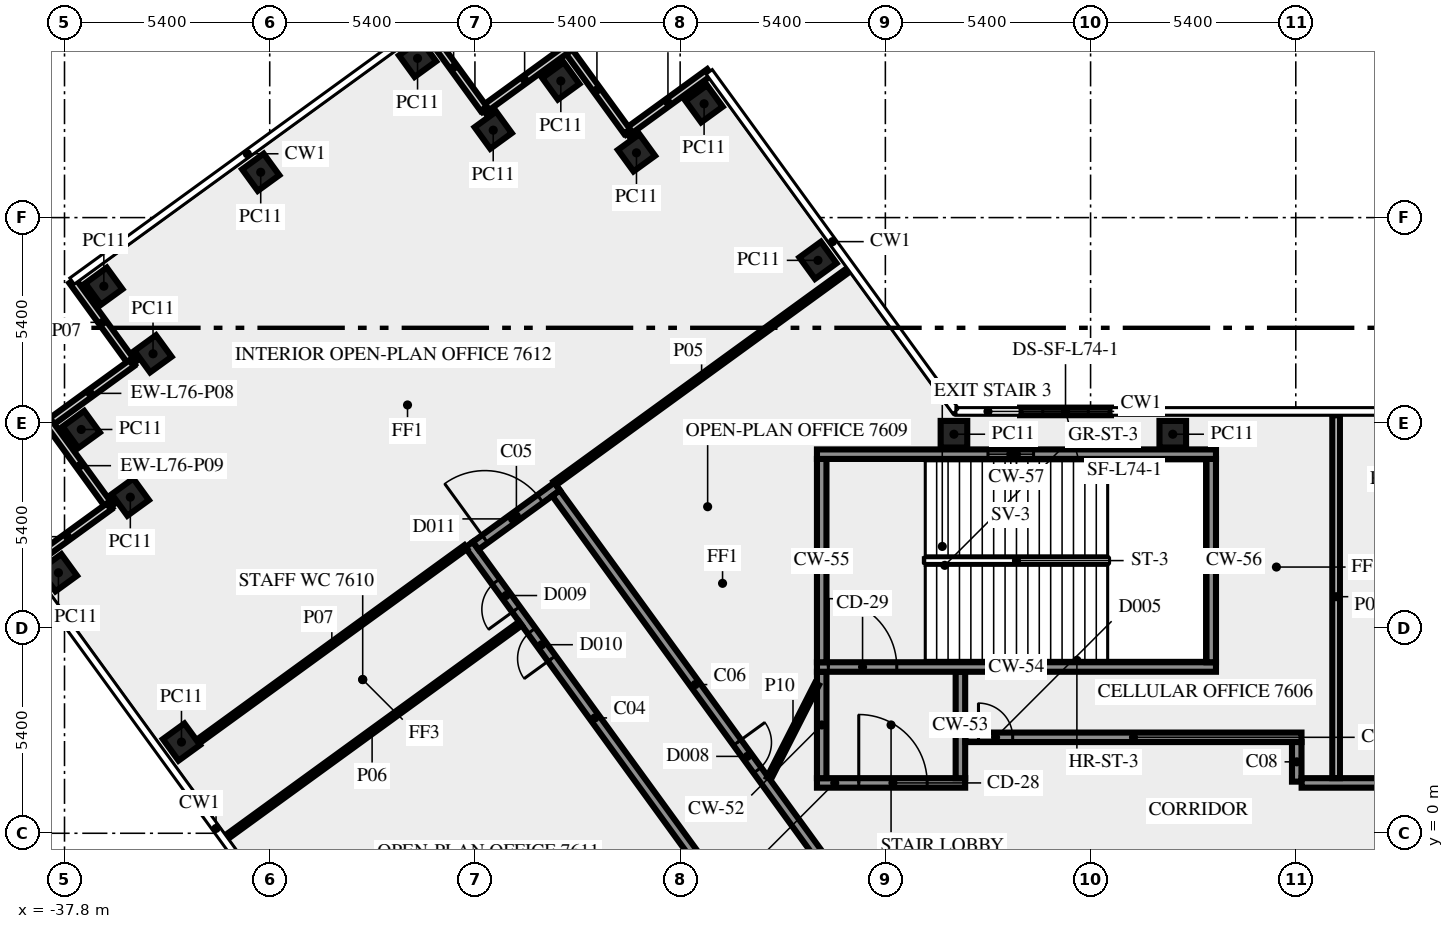
"""IFC4 building model, lengths in metres.
Left out: names, types, materials, properties, quantities, classifications, styles, units other than length and angle.
Written with IfcOpenShell. Run it as: python <this file> out.ifc"""

import sys

from ifc_helpers import new_model, si_unit, direction, frame, frame_2d, origin, origin_2d, place, context, subcontext, project, spatial, rectangle, extrude, element, fill, save


model = new_model("IFC4")
c1 = context("Model", 3, precision=1e-05, world=origin(), true_north=direction((0.0, 1.0)))
c2 = subcontext(c1, "Body", "Model", "MODEL_VIEW")
j1 = project(units=[si_unit("LENGTHUNIT", "METRE"), si_unit("PLANEANGLEUNIT", "RADIAN")], contexts=[c1])
p1 = place(None, origin())
s1 = spatial("IfcSite", under=j1, at=p1, CompositionType="ELEMENT")
p2 = place(p1, origin())
s2 = spatial("IfcBuilding", under=s1, at=p2, CompositionType="ELEMENT")
p3 = place(p2, frame((0.0, 0.0, 327.0)))
s3 = spatial("IfcBuildingStorey", under=s2, at=p3, CompositionType="ELEMENT", Elevation=327.0)
for number, where, z_axis, x_axis in (
    (1, (-17.974, 15.075, 0.0), (0.0, 0.0, 1.0), (-0.588, 0.809, 0.0)),
    (2, (-20.97, 19.195, 0.0), (0.0, 0.0, 1.0), (-0.588, 0.809, 0.0)),
    (3, (-22.749, 17.904, 0.0), (0.0, 0.0, 1.0), (-0.588, 0.809, 0.0)),
    (4, (-24.74, 19.795, 0.0), (0.0, 0.0, 1.0), (-0.588, 0.809, 0.0)),
    (5, (-26.519, 18.5, 0.0), (0.0, 0.0, 1.0), (-0.588, 0.809, 0.0)),
    (6, (-28.51, 20.39, 0.0), (0.0, 0.0, 1.0), (-0.809, -0.588, 0.0)),
    (7, (-32.637, 17.393, 0.0), (0.0, 0.0, 1.0), (-0.809, -0.588, 0.0)),
    (8, (-36.765, 14.395, 0.0), (0.0, 0.0, 1.0), (0.588, -0.809, 0.0)),
    (9, (-35.471, 12.616, 0.0), (0.0, 0.0, 1.0), (-0.809, -0.588, 0.0)),
    (10, (-37.36, 10.625, 0.0), (0.0, 0.0, 1.0), (0.588, -0.809, 0.0)),
    (11, (-36.068, 8.844, 0.0), (0.0, 0.0, 1.0), (0.588, -0.809, 0.0)),
    (12, (-37.96, 6.855, 0.0), (0.0, 0.0, 1.0), (0.588, -0.809, 0.0)),
    (13, (-34.722, 2.4, 0.0), (0.0, 0.0, 1.0), (0.588, -0.809, 0.0)),
    (14, (-8.637, 10.5, 0.0), (0.0, 0.0, 1.0), (-1.0, 0.0, 0.0)),
    (15, (-14.395, 10.5, 0.0), (0.0, 0.0, 1.0), (-1.0, 0.0, 0.0)),
):
    element("IfcColumn", number, at=place(p3, frame(where, z_axis=z_axis, x_axis=x_axis)), inside=s3, PredefinedType="COLUMN", context=c2, shape_type="SweptSolid", body=[
        extrude(rectangle(XDim=0.7, YDim=0.7, at=origin_2d()), origin(), (0.0, 0.0, 1.0), 3.65),
    ])
for number, where, z_axis, x_axis in (
    (16, (-20.829, 20.025, 0.0), (0.0, 0.0, 1.0), (-0.809, -0.588, 0.0)),
    (17, (-22.996, 18.466, 0.0), (0.0, 0.0, 1.0), (-0.588, 0.809, 0.0)),
):
    element("IfcWall", number, at=place(p3, frame(where, z_axis=z_axis, x_axis=x_axis)), inside=s3, PredefinedType="SOLIDWALL", context=c2, shape_type="SweptSolid", body=[
        extrude(rectangle(XDim=2.7, YDim=0.2, at=frame_2d((1.35, 0.0))), origin(), (0.0, 0.0, 1.0), 3.65),
    ])
for number, where, z_axis, x_axis in (
    (18, (-24.6, 20.623, 0.0), (0.0, 0.0, 1.0), (-0.809, -0.588, 0.0)),
    (19, (-26.768, 19.063, 0.0), (0.0, 0.0, 1.0), (-0.588, 0.809, 0.0)),
):
    element("IfcWall", number, at=place(p3, frame(where, z_axis=z_axis, x_axis=x_axis)), inside=s3, PredefinedType="SOLIDWALL", context=c2, shape_type="SweptSolid", body=[
        extrude(rectangle(XDim=2.7, YDim=0.2, at=frame_2d((1.35, 0.0))), origin(), (0.0, 0.0, 1.0), 3.65),
    ])
for number, where, z_axis, x_axis in (
    (20, (-37.592, 14.536, 0.0), (0.0, 0.0, 1.0), (0.588, -0.809, 0.0)),
    (21, (-36.032, 12.369, 0.0), (0.0, 0.0, 1.0), (-0.809, -0.588, 0.0)),
    (22, (-38.189, 10.765, 0.0), (0.0, 0.0, 1.0), (0.588, -0.809, 0.0)),
    (23, (-36.629, 8.597, 0.0), (0.0, 0.0, 1.0), (-0.809, -0.588, 0.0)),
):
    element("IfcWall", number, at=place(p3, frame(where, z_axis=z_axis, x_axis=x_axis)), inside=s3, PredefinedType="SOLIDWALL", context=c2, shape_type="SweptSolid", body=[
        extrude(rectangle(XDim=2.7, YDim=0.2, at=frame_2d((1.35, 0.0))), origin(), (0.0, 0.0, 1.0), 3.65),
    ])
p4 = place(p3, frame((-10.263, 11.1, 0.0), z_axis=(0.0, 0.0, 1.0), x_axis=(-1.0, 0.0, 0.0)))
e24 = element("IfcWall", 24, at=p4, inside=s3, PredefinedType="SOLIDWALL", context=c2, shape_type="SweptSolid", body=[
    extrude(rectangle(XDim=2.392, YDim=0.2, at=frame_2d((1.196, 0.0))), origin(), (0.0, 0.0, 1.0), 3.65),
])
p5 = place(p4, frame((0.596, 0.0, 1.0)))
e25 = element("IfcOpeningElement", 25, at=p5, cuts=e24, PredefinedType="OPENING", context=c2, shape_type="SweptSolid", body=[
    extrude(rectangle(XDim=1.2, YDim=1.2, at=frame_2d((0.6, 0.6))), frame((0.0, 0.11, 0.0), z_axis=(0.0, -1.0, 0.0), x_axis=(1.0, 0.0, 0.0)), (0.0, 0.0, 1.0), 0.22),
])
p6 = place(p3, frame((-18.0, 1.325, 0.0), z_axis=(0.0, 0.0, 1.0), x_axis=(1.0, 0.0, 0.0)))
e26 = element("IfcWall", 26, at=p6, inside=s3, PredefinedType="SHEAR", context=c2, shape_type="SweptSolid", body=[
    extrude(rectangle(XDim=3.9, YDim=0.25, at=frame_2d((1.95, 0.0))), origin(), (0.0, 0.0, 1.0), 3.65),
])
p7 = place(p6, frame((1.1, 0.0, 0.0)))
e27 = element("IfcOpeningElement", 27, at=p7, cuts=e26, PredefinedType="OPENING", context=c2, shape_type="SweptSolid", body=[
    extrude(rectangle(XDim=1.8, YDim=2.1, at=frame_2d((0.9, 1.05))), frame((0.0, 0.135, 0.0), z_axis=(0.0, -1.0, 0.0), x_axis=(1.0, 0.0, 0.0)), (0.0, 0.0, 1.0), 0.27),
])
for number, where, z_axis, x_axis in (
    (28, (-17.875, 1.45, 0.0), (0.0, 0.0, 1.0), (0.0, 1.0, 0.0)),
    (29, (-14.225, 1.45, 0.0), (0.0, 0.0, 1.0), (0.0, 1.0, 0.0)),
):
    element("IfcWall", number, at=place(p3, frame(where, z_axis=z_axis, x_axis=x_axis)), inside=s3, PredefinedType="SHEAR", context=c2, shape_type="SweptSolid", body=[
        extrude(rectangle(XDim=2.8, YDim=0.25, at=frame_2d((1.4, 0.0))), origin(), (0.0, 0.0, 1.0), 3.65),
    ])
p8 = place(p3, frame((-18.0, 4.375, 0.0), z_axis=(0.0, 0.0, 1.0), x_axis=(1.0, 0.0, 0.0)))
e30 = element("IfcWall", 30, at=p8, inside=s3, PredefinedType="SHEAR", context=c2, shape_type="SweptSolid", body=[
    extrude(rectangle(XDim=10.5, YDim=0.25, at=frame_2d((5.25, 0.0))), origin(), (0.0, 0.0, 1.0), 3.65),
])
p9 = place(p8, frame((0.3, 0.0, 0.0)))
e31 = element("IfcOpeningElement", 31, at=p9, cuts=e30, PredefinedType="OPENING", context=c2, shape_type="SweptSolid", body=[
    extrude(rectangle(XDim=1.8, YDim=2.1, at=frame_2d((0.9, 1.05))), frame((0.0, 0.135, 0.0), z_axis=(0.0, -1.0, 0.0), x_axis=(1.0, 0.0, 0.0)), (0.0, 0.0, 1.0), 0.27),
])
for number, where, z_axis, x_axis in (
    (32, (-17.875, 4.5, 0.0), (0.0, 0.0, 1.0), (0.0, 1.0, 0.0)),
    (33, (-7.625, 4.5, 0.0), (0.0, 0.0, 1.0), (0.0, 1.0, 0.0)),
):
    element("IfcWall", number, at=place(p3, frame(where, z_axis=z_axis, x_axis=x_axis)), inside=s3, PredefinedType="SHEAR", context=c2, shape_type="SweptSolid", body=[
        extrude(rectangle(XDim=5.35, YDim=0.25, at=frame_2d((2.675, 0.0))), origin(), (0.0, 0.0, 1.0), 3.65),
    ])
p10 = place(p3, frame((-18.0, 9.975, 0.0), z_axis=(0.0, 0.0, 1.0), x_axis=(1.0, 0.0, 0.0)))
e34 = element("IfcWall", 34, at=p10, inside=s3, PredefinedType="SHEAR", context=c2, shape_type="SweptSolid", body=[
    extrude(rectangle(XDim=10.5, YDim=0.25, at=frame_2d((5.25, 0.0))), origin(), (0.0, 0.0, 1.0), 3.65),
])
p11 = place(p10, frame((4.5, 0.0, 1.0)))
e35 = element("IfcOpeningElement", 35, at=p11, cuts=e34, PredefinedType="OPENING", context=c2, shape_type="SweptSolid", body=[
    extrude(rectangle(XDim=1.2, YDim=1.2, at=frame_2d((0.6, 0.6))), frame((0.0, 0.135, 0.0), z_axis=(0.0, -1.0, 0.0), x_axis=(1.0, 0.0, 0.0)), (0.0, 0.0, 1.0), 0.27),
])
p12 = place(p3, frame((-20.531, -1.523, 0.0), z_axis=(0.0, 0.0, 1.0), x_axis=(-0.587782646447, 0.809018887626, 0.0)))
e36 = element("IfcWall", 36, at=p12, inside=s3, PredefinedType="SOLIDWALL", context=c2, shape_type="SweptSolid", body=[
    extrude(rectangle(XDim=11.27, YDim=0.25, at=frame_2d((5.635, 0.0))), origin(), (0.0, 0.0, 1.0), 3.65),
])
p13 = place(p12, frame((7.566, 0.0, 0.0)))
e37 = element("IfcOpeningElement", 37, at=p13, cuts=e36, PredefinedType="OPENING", context=c2, shape_type="SweptSolid", body=[
    extrude(rectangle(XDim=0.9, YDim=2.1, at=frame_2d((0.45, 1.05))), frame((0.0, 0.135, 0.0), z_axis=(0.0, -1.0, 0.0), x_axis=(1.0, 0.0, 0.0)), (0.0, 0.0, 1.0), 0.27),
])
p14 = place(p12, frame((9.165, 0.0, 0.0)))
e38 = element("IfcOpeningElement", 38, at=p14, cuts=e36, PredefinedType="OPENING", context=c2, shape_type="SweptSolid", body=[
    extrude(rectangle(XDim=0.9, YDim=2.1, at=frame_2d((0.45, 1.05))), frame((0.0, 0.135, 0.0), z_axis=(0.0, -1.0, 0.0), x_axis=(1.0, 0.0, 0.0)), (0.0, 0.0, 1.0), 0.27),
])
p15 = place(p3, frame((-26.981, 7.567, 0.0), z_axis=(0.0, 0.0, 1.0), x_axis=(0.809038743598, 0.587755315891, 0.0)))
e39 = element("IfcWall", 39, at=p15, inside=s3, PredefinedType="SOLIDWALL", context=c2, shape_type="SweptSolid", body=[
    extrude(rectangle(XDim=2.65, YDim=0.25, at=frame_2d((1.325, 0.0))), origin(), (0.0, 0.0, 1.0), 3.65),
])
p16 = place(p15, frame((0.3, 0.0, 0.0)))
e40 = element("IfcOpeningElement", 40, at=p16, cuts=e39, PredefinedType="OPENING", context=c2, shape_type="SweptSolid", body=[
    extrude(rectangle(XDim=1.8, YDim=2.1, at=frame_2d((0.9, 1.05))), frame((0.0, 0.135, 0.0), z_axis=(0.0, -1.0, 0.0), x_axis=(1.0, 0.0, 0.0)), (0.0, 0.0, 1.0), 0.27),
])
p17 = place(p3, frame((-24.865, 8.95, 0.0), z_axis=(0.0, 0.0, 1.0), x_axis=(0.587791617212, -0.809012369952, 0.0)))
e41 = element("IfcWall", 41, at=p17, inside=s3, PredefinedType="SOLIDWALL", context=c2, shape_type="SweptSolid", body=[
    extrude(rectangle(XDim=12.453, YDim=0.25, at=frame_2d((6.227, 0.0))), origin(), (0.0, 0.0, 1.0), 3.65),
])
p18 = place(p17, frame((8.112, 0.0, 0.0)))
e42 = element("IfcOpeningElement", 42, at=p18, cuts=e41, PredefinedType="OPENING", context=c2, shape_type="SweptSolid", body=[
    extrude(rectangle(XDim=0.9, YDim=2.1, at=frame_2d((0.45, 1.05))), frame((0.0, 0.135, 0.0), z_axis=(0.0, -1.0, 0.0), x_axis=(1.0, 0.0, 0.0)), (0.0, 0.0, 1.0), 0.27),
])
p19 = place(p3, frame((-14.09, 2.525, 0.0), z_axis=(0.0, 0.0, 1.0), x_axis=(1.0, 0.0, 0.0)))
e43 = element("IfcWall", 43, at=p19, inside=s3, PredefinedType="SOLIDWALL", context=c2, shape_type="SweptSolid", body=[
    extrude(rectangle(XDim=8.84, YDim=0.25, at=frame_2d((4.42, 0.0))), origin(), (0.0, 0.0, 1.0), 3.65),
])
p20 = place(p19, frame((0.34, 0.0, 0.0)))
e44 = element("IfcOpeningElement", 44, at=p20, cuts=e43, PredefinedType="OPENING", context=c2, shape_type="SweptSolid", body=[
    extrude(rectangle(XDim=0.9, YDim=2.1, at=frame_2d((0.45, 1.05))), frame((0.0, 0.135, 0.0), z_axis=(0.0, -1.0, 0.0), x_axis=(1.0, 0.0, 0.0)), (0.0, 0.0, 1.0), 0.27),
])
p21 = place(p3, frame((-5.375, 2.4, 0.0), z_axis=(0.0, 0.0, 1.0), x_axis=(0.0, -1.0, 0.0)))
e45 = element("IfcWall", 45, at=p21, inside=s3, PredefinedType="SOLIDWALL", context=c2, shape_type="SweptSolid", body=[
    extrude(rectangle(XDim=1.041, YDim=0.25, at=frame_2d((0.521, 0.0))), origin(), (0.0, 0.0, 1.0), 3.65),
])
p22 = place(p3, frame((-5.246, 1.325, 0.0), z_axis=(0.0, 0.0, 1.0), x_axis=(1.0, 0.0, 0.0)))
e46 = element("IfcWall", 46, at=p22, inside=s3, PredefinedType="SOLIDWALL", context=c2, shape_type="SweptSolid", body=[
    extrude(rectangle(XDim=19.336, YDim=0.25, at=frame_2d((9.668, 0.0))), origin(), (0.0, 0.0, 1.0), 3.65),
])
p23 = place(p22, frame((10.894, 0.0, 0.0)))
e47 = element("IfcOpeningElement", 47, at=p23, cuts=e46, PredefinedType="OPENING", context=c2, shape_type="SweptSolid", body=[
    extrude(rectangle(XDim=1.2, YDim=2.1, at=frame_2d((0.6, 1.05))), frame((0.0, 0.135, 0.0), z_axis=(0.0, -1.0, 0.0), x_axis=(1.0, 0.0, 0.0)), (0.0, 0.0, 1.0), 0.27),
])
p24 = place(p22, frame((18.096, 0.0, 0.0)))
e48 = element("IfcOpeningElement", 48, at=p24, cuts=e46, PredefinedType="OPENING", context=c2, shape_type="SweptSolid", body=[
    extrude(rectangle(XDim=0.9, YDim=2.1, at=frame_2d((0.45, 1.05))), frame((0.0, 0.135, 0.0), z_axis=(0.0, -1.0, 0.0), x_axis=(1.0, 0.0, 0.0)), (0.0, 0.0, 1.0), 0.27),
])
p25 = place(p3, frame((-4.339, 1.45, 0.0), z_axis=(0.0, 0.0, 1.0), x_axis=(0.0, 1.0, 0.0)))
e49 = element("IfcWall", 49, at=p25, inside=s3, PredefinedType="SOLIDWALL", context=c2, shape_type="SweptSolid", body=[
    extrude(rectangle(XDim=9.55, YDim=0.2, at=frame_2d((4.775, 0.0))), origin(), (0.0, 0.0, 1.0), 2.95),
])
p26 = place(p3, frame((-17.172, 14.823, 0.0), z_axis=(0.0, 0.0, 1.0), x_axis=(-0.809013490065, -0.587790075531, 0.0)))
e50 = element("IfcWall", 50, at=p26, inside=s3, PredefinedType="PARTITIONING", context=c2, shape_type="SweptSolid", body=[
    extrude(rectangle(XDim=9.549, YDim=0.12, at=frame_2d((4.775, 0.0))), origin(), (0.0, 0.0, 1.0), 2.95),
])
p27 = place(p3, frame((-25.802, 5.519, 0.0), z_axis=(0.0, 0.0, 1.0), x_axis=(-0.808994179369, -0.587816653173, 0.0)))
e51 = element("IfcWall", 51, at=p27, inside=s3, PredefinedType="PARTITIONING", context=c2, shape_type="SweptSolid", body=[
    extrude(rectangle(XDim=9.651, YDim=0.12, at=frame_2d((4.825, 0.0))), origin(), (0.0, 0.0, 1.0), 2.95),
])
p28 = place(p3, frame((-34.291, 2.41, 0.0), z_axis=(0.0, 0.0, 1.0), x_axis=(0.809027940177, 0.587770186393, 0.0)))
e52 = element("IfcWall", 52, at=p28, inside=s3, PredefinedType="PARTITIONING", context=c2, shape_type="SweptSolid", body=[
    extrude(rectangle(XDim=8.715, YDim=0.12, at=frame_2d((4.357, 0.0))), origin(), (0.0, 0.0, 1.0), 3.65),
])
p29 = place(p3, frame((-19.261, 1.45, 0.0), z_axis=(0.0, 0.0, 1.0), x_axis=(0.453950796792, 0.891026752736, 0.0)))
e53 = element("IfcWall", 53, at=p29, inside=s3, PredefinedType="PARTITIONING", context=c2, shape_type="SweptSolid", body=[
    extrude(rectangle(XDim=2.778, YDim=0.12, at=frame_2d((1.389, 0.0))), origin(), (0.0, 0.0, 1.0), 3.65),
])
p30 = place(p5, origin())
e54 = element("IfcWindow", 54, at=p30, inside=s3, PartitioningType="SINGLE_PANEL", PredefinedType="WINDOW", context=c2, shape_type="SweptSolid", body=[
    extrude(rectangle(XDim=1.2, YDim=1.2, at=frame_2d((0.6, 0.6))), frame((0.0, 0.03, 0.0), z_axis=(0.0, -1.0, 0.0), x_axis=(1.0, 0.0, 0.0)), (0.0, 0.0, 1.0), 0.06),
])
fill(e25, e54)
p31 = place(p7, origin())
e55 = element("IfcDoor", 55, at=p31, inside=s3, OperationType="DOUBLE_DOOR_SINGLE_SWING", PredefinedType="DOOR", context=c2, shape_type="SweptSolid", body=[
    extrude(rectangle(XDim=1.8, YDim=2.1, at=frame_2d((0.9, 1.05))), frame((0.0, 0.025, 0.0), z_axis=(0.0, -1.0, 0.0), x_axis=(1.0, 0.0, 0.0)), (0.0, 0.0, 1.0), 0.05),
])
fill(e27, e55)
p32 = place(p9, origin())
e56 = element("IfcDoor", 56, at=p32, inside=s3, OperationType="DOUBLE_DOOR_SINGLE_SWING", PredefinedType="DOOR", context=c2, shape_type="SweptSolid", body=[
    extrude(rectangle(XDim=1.8, YDim=2.1, at=frame_2d((0.9, 1.05))), frame((0.0, 0.025, 0.0), z_axis=(0.0, -1.0, 0.0), x_axis=(1.0, 0.0, 0.0)), (0.0, 0.0, 1.0), 0.05),
])
fill(e31, e56)
p33 = place(p11, origin())
e57 = element("IfcWindow", 57, at=p33, inside=s3, PartitioningType="SINGLE_PANEL", PredefinedType="WINDOW", context=c2, shape_type="SweptSolid", body=[
    extrude(rectangle(XDim=1.2, YDim=1.2, at=frame_2d((0.6, 0.6))), frame((0.0, 0.03, 0.0), z_axis=(0.0, -1.0, 0.0), x_axis=(1.0, 0.0, 0.0)), (0.0, 0.0, 1.0), 0.06),
])
fill(e35, e57)
p34 = place(p20, origin())
e58 = element("IfcDoor", 58, at=p34, inside=s3, OperationType="SINGLE_SWING_LEFT", PredefinedType="DOOR", context=c2, shape_type="SweptSolid", body=[
    extrude(rectangle(XDim=0.9, YDim=2.1, at=frame_2d((0.45, 1.05))), frame((0.0, 0.025, 0.0), z_axis=(0.0, -1.0, 0.0), x_axis=(1.0, 0.0, 0.0)), (0.0, 0.0, 1.0), 0.05),
])
fill(e44, e58)
p35 = place(p18, origin())
e59 = element("IfcDoor", 59, at=p35, inside=s3, OperationType="SINGLE_SWING_RIGHT", PredefinedType="DOOR", context=c2, shape_type="SweptSolid", body=[
    extrude(rectangle(XDim=0.9, YDim=2.1, at=frame_2d((0.45, 1.05))), frame((0.0, 0.025, 0.0), z_axis=(0.0, -1.0, 0.0), x_axis=(1.0, 0.0, 0.0)), (0.0, 0.0, 1.0), 0.05),
])
fill(e42, e59)
p36 = place(p13, origin())
e60 = element("IfcDoor", 60, at=p36, inside=s3, OperationType="SINGLE_SWING_RIGHT", PredefinedType="DOOR", context=c2, shape_type="SweptSolid", body=[
    extrude(rectangle(XDim=0.9, YDim=2.1, at=frame_2d((0.45, 1.05))), frame((0.0, 0.025, 0.0), z_axis=(0.0, -1.0, 0.0), x_axis=(1.0, 0.0, 0.0)), (0.0, 0.0, 1.0), 0.05),
])
fill(e37, e60)
p37 = place(p16, origin())
e61 = element("IfcDoor", 61, at=p37, inside=s3, OperationType="DOUBLE_DOOR_SINGLE_SWING", PredefinedType="DOOR", context=c2, shape_type="SweptSolid", body=[
    extrude(rectangle(XDim=1.8, YDim=2.1, at=frame_2d((0.9, 1.05))), frame((0.0, 0.025, 0.0), z_axis=(0.0, -1.0, 0.0), x_axis=(1.0, 0.0, 0.0)), (0.0, 0.0, 1.0), 0.05),
])
fill(e40, e61)
p38 = place(p14, origin())
e62 = element("IfcDoor", 62, at=p38, inside=s3, OperationType="SINGLE_SWING_LEFT", PredefinedType="DOOR", context=c2, shape_type="SweptSolid", body=[
    extrude(rectangle(XDim=0.9, YDim=2.1, at=frame_2d((0.45, 1.05))), frame((0.0, 0.025, 0.0), z_axis=(0.0, -1.0, 0.0), x_axis=(1.0, 0.0, 0.0)), (0.0, 0.0, 1.0), 0.05),
])
fill(e38, e62)
save(model, sys.argv[1])
